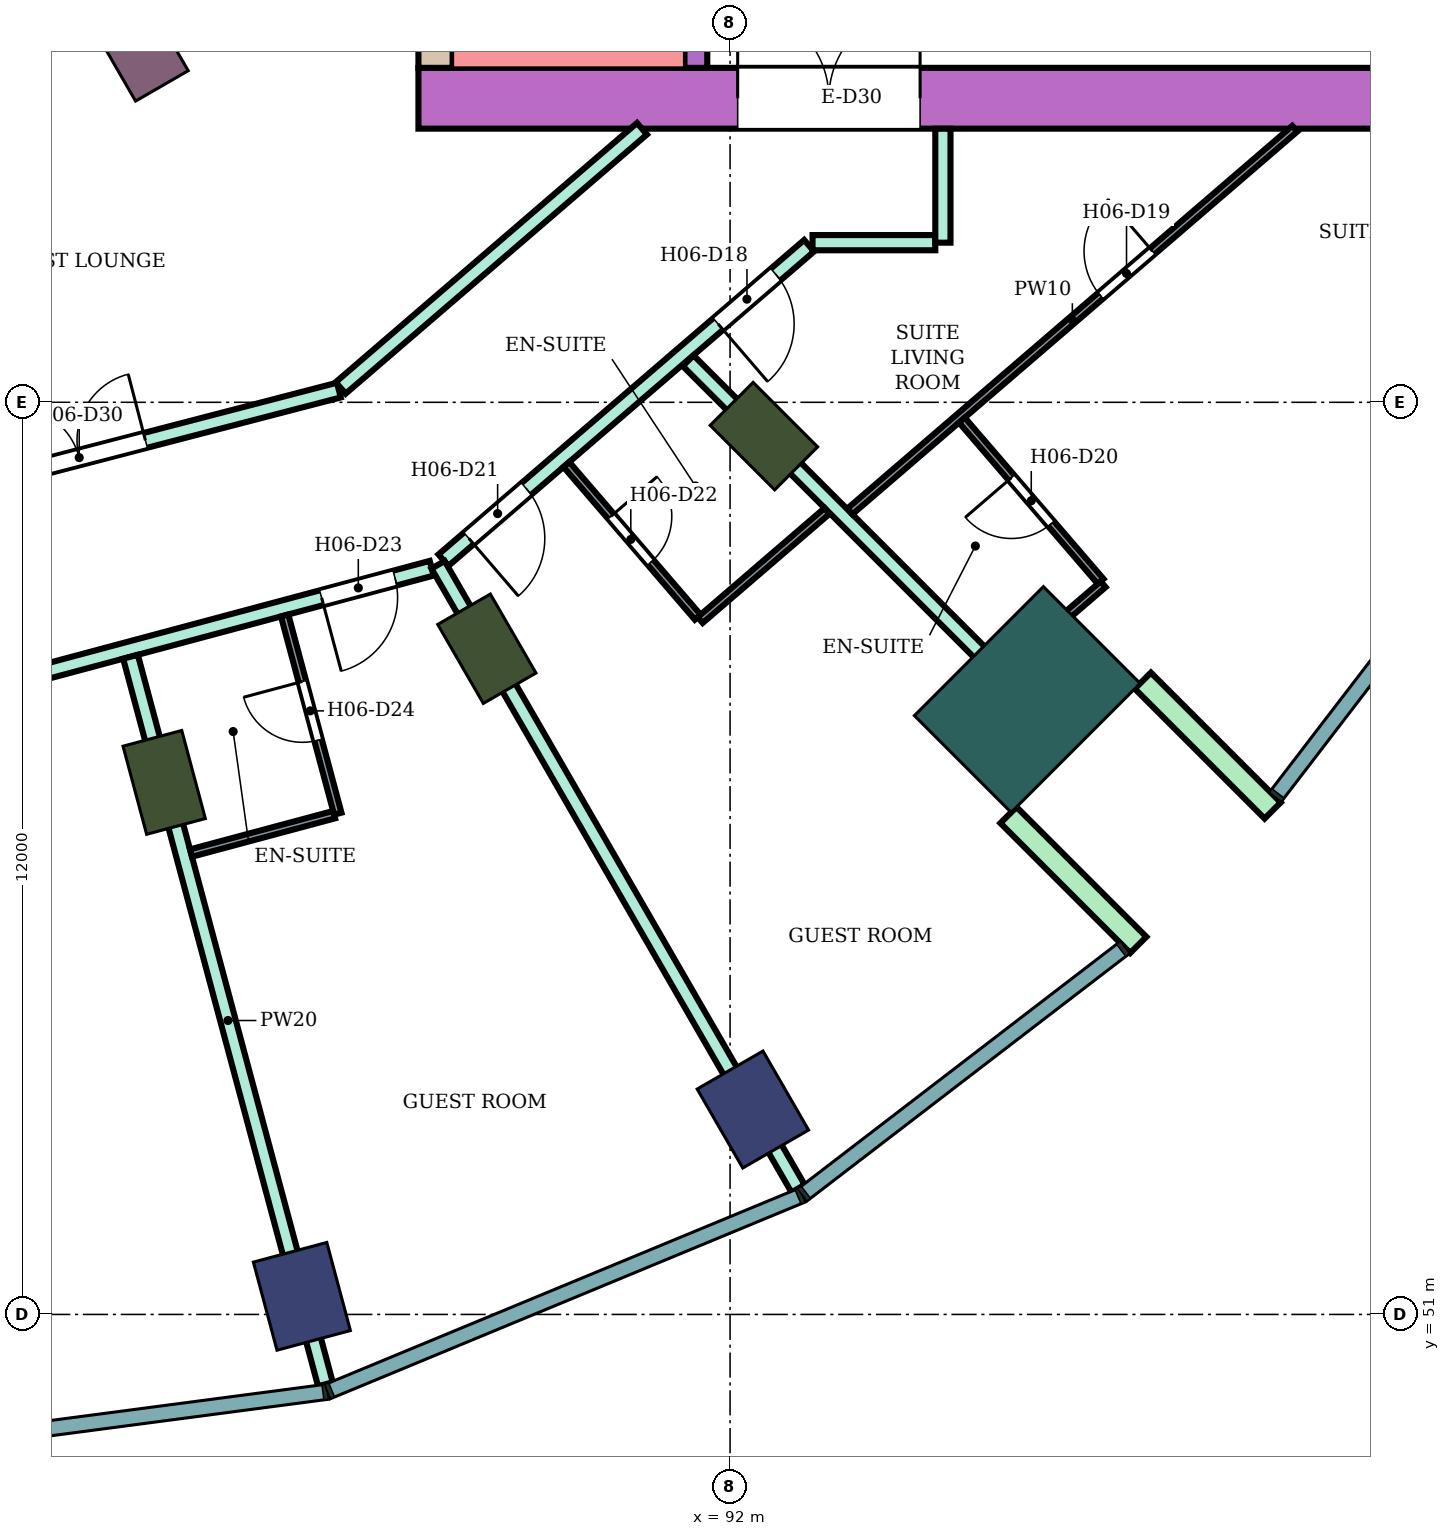
"""IFC4 building model, lengths in metres.
Left out: names, types, materials, properties, quantities, classifications, styles, units other than length and angle.
Written with IfcOpenShell. Run it as: python <this file> out.ifc"""

import sys

from ifc_helpers import new_model, si_unit, direction, frame, frame_2d, origin, origin_2d, place, context, subcontext, project, spatial, rectangle, extrude, element, fill, save


model = new_model("IFC4")
c1 = context("Model", 3, precision=1e-05, world=origin(), true_north=direction((0.0, 1.0)))
c2 = subcontext(c1, "Body", "Model", "MODEL_VIEW")
j1 = project(units=[si_unit("LENGTHUNIT", "METRE"), si_unit("PLANEANGLEUNIT", "RADIAN")], contexts=[c1])
p1 = place(None, origin())
s1 = spatial("IfcSite", under=j1, at=p1, CompositionType="ELEMENT")
p2 = place(p1, origin())
s2 = spatial("IfcBuilding", under=s1, at=p2, CompositionType="ELEMENT")
p3 = place(p2, frame((0.0, 0.0, 97.6)))
s3 = spatial("IfcBuildingStorey", under=s2, at=p3, CompositionType="ELEMENT", Elevation=97.6)
for number, where, z_axis, x_axis in (
    (1, (86.367, 51.238, 0.0), (0.0, 0.0, 1.0), (0.259, -0.966, 0.0)),
    (2, (92.3, 53.696, 0.0), (0.0, 0.0, 1.0), (0.5, -0.866, 0.0)),
):
    element("IfcColumn", number, at=place(p3, frame(where, z_axis=z_axis, x_axis=x_axis)), inside=s3, PredefinedType="COLUMN", context=c2, shape_type="SweptSolid", body=[
        extrude(rectangle(XDim=1.2, YDim=1.0, at=origin_2d()), origin(), (0.0, 0.0, 1.0), 3.8),
    ])
for number, where, z_axis, x_axis in (
    (3, (84.555, 58.0, 0.0), (0.0, 0.0, 1.0), (0.259, -0.966, 0.0)),
    (4, (88.8, 59.758, 0.0), (0.0, 0.0, 1.0), (0.5, -0.866, 0.0)),
    (5, (92.445, 62.555, 0.0), (0.0, 0.0, 1.0), (0.707, -0.707, 0.0)),
):
    element("IfcColumn", number, at=place(p3, frame(where, z_axis=z_axis, x_axis=x_axis)), inside=s3, PredefinedType="COLUMN", context=c2, shape_type="SweptSolid", body=[
        extrude(rectangle(XDim=1.2, YDim=0.8, at=origin_2d()), origin(), (0.0, 0.0, 1.0), 3.8),
    ])
p4 = place(p3, frame((84.3, 67.552, 0.0), z_axis=(0.0, 0.0, 1.0), x_axis=(0.5, -0.866025403784, 0.0)))
e6 = element("IfcColumn", 6, at=p4, inside=s3, PredefinedType="COLUMN", context=c2, shape_type="SweptSolid", body=[
    extrude(rectangle(XDim=0.9, YDim=0.8, at=origin_2d()), origin(), (0.0, 0.0, 1.0), 3.8),
])
p5 = place(p3, frame((95.91, 59.09, 0.0), z_axis=(0.0, 0.0, 1.0), x_axis=(0.707106781187, -0.707106781187, 0.0)))
e7 = element("IfcColumn", 7, at=p5, inside=s3, PredefinedType="COLUMN", context=c2, shape_type="SweptSolid", body=[
    extrude(rectangle(XDim=1.8, YDim=2.4, at=origin_2d()), origin(), (0.0, 0.0, 1.0), 3.8),
])
p6 = place(p3, frame((87.9, 67.0, 0.0), z_axis=(0.0, 0.0, 1.0), x_axis=(1.0, 0.0, 0.0)))
e8 = element("IfcWall", 8, at=p6, inside=s3, PredefinedType="SHEAR", context=c2, shape_type="SweptSolid", body=[
    extrude(rectangle(XDim=14.7, YDim=0.8, at=frame_2d((7.35, 0.0))), origin(), (0.0, 0.0, 1.0), 3.48),
])
p7 = place(p6, frame((4.2, 0.0, 0.0)))
e9 = element("IfcOpeningElement", 9, at=p7, cuts=e8, PredefinedType="OPENING", context=c2, shape_type="SweptSolid", body=[
    extrude(rectangle(XDim=2.4, YDim=2.4, at=frame_2d((1.2, 1.2))), frame((0.0, 0.41, 0.0), z_axis=(0.0, -1.0, 0.0), x_axis=(1.0, 0.0, 0.0)), (0.0, 0.0, 1.0), 0.82),
])
p8 = place(p3, frame((88.125, 67.4, 0.0), z_axis=(0.0, 0.0, 1.0), x_axis=(0.0, 1.0, 0.0)))
e10 = element("IfcWall", 10, at=p8, inside=s3, PredefinedType="SHEAR", context=c2, shape_type="SweptSolid", body=[
    extrude(rectangle(XDim=7.6, YDim=0.45, at=frame_2d((3.8, 0.0))), origin(), (0.0, 0.0, 1.0), 3.48),
])
p9 = place(p3, frame((91.55, 67.4, 0.0), z_axis=(0.0, 0.0, 1.0), x_axis=(0.0, 1.0, 0.0)))
e11 = element("IfcWall", 11, at=p9, inside=s3, PredefinedType="SHEAR", context=c2, shape_type="SweptSolid", body=[
    extrude(rectangle(XDim=7.6, YDim=0.3, at=frame_2d((3.8, 0.0))), origin(), (0.0, 0.0, 1.0), 3.48),
])
p10 = place(p9, frame((0.25, 0.0, 0.0)))
e12 = element("IfcOpeningElement", 12, at=p10, cuts=e11, PredefinedType="OPENING", context=c2, shape_type="SweptSolid", body=[
    extrude(rectangle(XDim=0.9, YDim=2.1, at=frame_2d((0.45, 1.05))), frame((0.0, 0.16, 0.0), z_axis=(0.0, -1.0, 0.0), x_axis=(1.0, 0.0, 0.0)), (0.0, 0.0, 1.0), 0.32),
])
for number, where, z_axis, x_axis in (
    (13, (95.662, 57.57, 0.0), (0.0, 0.0, 1.0), (0.707, -0.707, 0.0)),
    (14, (97.43, 59.338, 0.0), (0.0, 0.0, 1.0), (0.707, -0.707, 0.0)),
):
    element("IfcWall", number, at=place(p3, frame(where, z_axis=z_axis, x_axis=x_axis)), inside=s3, PredefinedType="NOTDEFINED", context=c2, shape_type="SweptSolid", body=[
        extrude(rectangle(XDim=2.416, YDim=0.3, at=frame_2d((1.208, 0.0))), origin(), (0.0, 0.0, 1.0), 3.8),
    ])
p11 = place(p3, frame((80.0, 67.396, 0.0), z_axis=(0.0, 0.0, 1.0), x_axis=(0.965933654434, 0.258789828301, 0.0)))
e15 = element("IfcWall", 15, at=p11, inside=s3, PredefinedType="NOTDEFINED", context=c2, shape_type="SweptSolid", body=[
    extrude(rectangle(XDim=3.936, YDim=0.2, at=frame_2d((1.968, 0.0))), origin(), (0.0, 0.0, 1.0), 3.8),
])
p12 = place(p11, frame((0.468, 0.0, 0.9)))
e16 = element("IfcOpeningElement", 16, at=p12, cuts=e15, PredefinedType="OPENING", context=c2, shape_type="SweptSolid", body=[
    extrude(rectangle(XDim=3.0, YDim=2.3, at=frame_2d((1.5, 1.15))), frame((0.0, 0.11, 0.0), z_axis=(0.0, -1.0, 0.0), x_axis=(1.0, 0.0, 0.0)), (0.0, 0.0, 1.0), 0.22),
])
p13 = place(p3, frame((80.119, 61.41, 0.0), z_axis=(0.0, 0.0, 1.0), x_axis=(0.967823361235, 0.251630565408, 0.0)))
e17 = element("IfcWall", 17, at=p13, inside=s3, PredefinedType="PARTITIONING", context=c2, shape_type="SweptSolid", body=[
    extrude(rectangle(XDim=6.958, YDim=0.2, at=frame_2d((3.479, 0.0))), origin(), (0.0, 0.0, 1.0), 3.35),
])
p14 = place(p13, frame((2.529, 0.0, 0.0)))
e18 = element("IfcOpeningElement", 18, at=p14, cuts=e17, PredefinedType="OPENING", context=c2, shape_type="SweptSolid", body=[
    extrude(rectangle(XDim=1.8, YDim=2.1, at=frame_2d((0.9, 1.05))), frame((0.0, 0.11, 0.0), z_axis=(0.0, -1.0, 0.0), x_axis=(1.0, 0.0, 0.0)), (0.0, 0.0, 1.0), 0.22),
])
p15 = place(p3, frame((80.0, 58.655, 0.0), z_axis=(0.0, 0.0, 1.0), x_axis=(0.965967338894, 0.258664068224, 0.0)))
e19 = element("IfcWall", 19, at=p15, inside=s3, PredefinedType="PARTITIONING", context=c2, shape_type="SweptSolid", body=[
    extrude(rectangle(XDim=8.36, YDim=0.2, at=frame_2d((4.18, 0.0))), origin(), (0.0, 0.0, 1.0), 3.35),
])
p16 = place(p15, frame((6.86, 0.0, 0.0)))
e20 = element("IfcOpeningElement", 20, at=p16, cuts=e19, PredefinedType="OPENING", context=c2, shape_type="SweptSolid", body=[
    extrude(rectangle(XDim=1.0, YDim=2.1, at=frame_2d((0.5, 1.05))), frame((0.0, 0.11, 0.0), z_axis=(0.0, -1.0, 0.0), x_axis=(1.0, 0.0, 0.0)), (0.0, 0.0, 1.0), 0.22),
])
p17 = place(p3, frame((84.112, 59.652, 0.0), z_axis=(0.0, 0.0, 1.0), x_axis=(0.258792739659, -0.965932874428, 0.0)))
e21 = element("IfcWall", 21, at=p17, inside=s3, PredefinedType="PARTITIONING", context=c2, shape_type="SweptSolid", body=[
    extrude(rectangle(XDim=9.908, YDim=0.2, at=frame_2d((4.954, 0.0))), origin(), (0.0, 0.0, 1.0), 3.35),
])
p18 = place(p3, frame((86.877, 63.189, 0.0), z_axis=(0.0, 0.0, 1.0), x_axis=(0.758088707506, 0.652151448325, 0.0)))
e22 = element("IfcWall", 22, at=p18, inside=s3, PredefinedType="PARTITIONING", context=c2, shape_type="SweptSolid", body=[
    extrude(rectangle(XDim=5.229, YDim=0.2, at=frame_2d((2.615, 0.0))), origin(), (0.0, 0.0, 1.0), 3.35),
])
p19 = place(p3, frame((88.229, 60.923, 0.0), z_axis=(0.0, 0.0, 1.0), x_axis=(0.758220952094, 0.651997690031, 0.0)))
e23 = element("IfcWall", 23, at=p19, inside=s3, PredefinedType="PARTITIONING", context=c2, shape_type="SweptSolid", body=[
    extrude(rectangle(XDim=6.346, YDim=0.2, at=frame_2d((3.173, 0.0))), origin(), (0.0, 0.0, 1.0), 3.35),
])
p20 = place(p19, frame((4.767, 0.0, 0.0)))
e24 = element("IfcOpeningElement", 24, at=p20, cuts=e23, PredefinedType="OPENING", context=c2, shape_type="SweptSolid", body=[
    extrude(rectangle(XDim=1.0, YDim=2.1, at=frame_2d((0.5, 1.05))), frame((0.0, 0.11, 0.0), z_axis=(0.0, -1.0, 0.0), x_axis=(1.0, 0.0, 0.0)), (0.0, 0.0, 1.0), 0.22),
])
p21 = place(p19, frame((0.44, 0.0, 0.0)))
e25 = element("IfcOpeningElement", 25, at=p21, cuts=e23, PredefinedType="OPENING", context=c2, shape_type="SweptSolid", body=[
    extrude(rectangle(XDim=1.0, YDim=2.1, at=frame_2d((0.5, 1.05))), frame((0.0, 0.11, 0.0), z_axis=(0.0, -1.0, 0.0), x_axis=(1.0, 0.0, 0.0)), (0.0, 0.0, 1.0), 0.22),
])
p22 = place(p3, frame((88.158, 60.862, 0.0), z_axis=(0.0, 0.0, 1.0), x_axis=(0.499916512745, -0.866073599808, 0.0)))
e26 = element("IfcWall", 26, at=p22, inside=s3, PredefinedType="PARTITIONING", context=c2, shape_type="SweptSolid", body=[
    extrude(rectangle(XDim=9.475, YDim=0.2, at=frame_2d((4.737, 0.0))), origin(), (0.0, 0.0, 1.0), 3.35),
])
p23 = place(p3, frame((91.448, 63.547, 0.0), z_axis=(0.0, 0.0, 1.0), x_axis=(0.706949958062, -0.707263569538, 0.0)))
e27 = element("IfcWall", 27, at=p23, inside=s3, PredefinedType="PARTITIONING", context=c2, shape_type="SweptSolid", body=[
    extrude(rectangle(XDim=7.006, YDim=0.2, at=frame_2d((3.503, 0.0))), origin(), (0.0, 0.0, 1.0), 3.35),
])
p24 = place(p3, frame((93.085, 65.1, 0.0), z_axis=(0.0, 0.0, 1.0), x_axis=(1.0, 0.0, 0.0)))
e28 = element("IfcWall", 28, at=p24, inside=s3, PredefinedType="PARTITIONING", context=c2, shape_type="SweptSolid", body=[
    extrude(rectangle(XDim=1.615, YDim=0.2, at=frame_2d((0.808, 0.0))), origin(), (0.0, 0.0, 1.0), 3.35),
])
p25 = place(p3, frame((94.8, 65.1, 0.0), z_axis=(0.0, 0.0, 1.0), x_axis=(0.0, 1.0, 0.0)))
e29 = element("IfcWall", 29, at=p25, inside=s3, PredefinedType="PARTITIONING", context=c2, shape_type="SweptSolid", body=[
    extrude(rectangle(XDim=1.499, YDim=0.2, at=frame_2d((0.75, 0.0))), origin(), (0.0, 0.0, 1.0), 3.35),
])
p26 = place(p3, frame((84.908, 57.07, 0.0), z_axis=(0.0, 0.0, 1.0), x_axis=(0.965853538138, 0.25908867761, 0.0)))
e30 = element("IfcWall", 30, at=p26, inside=s3, PredefinedType="PARTITIONING", context=c2, shape_type="SweptSolid", body=[
    extrude(rectangle(XDim=1.95, YDim=0.1, at=frame_2d((0.975, 0.0))), origin(), (0.0, 0.0, 1.0), 3.35),
])
p27 = place(p3, frame((86.14, 60.196, 0.0), z_axis=(0.0, 0.0, 1.0), x_axis=(0.258945475746, -0.965891940432, 0.0)))
e31 = element("IfcWall", 31, at=p27, inside=s3, PredefinedType="PARTITIONING", context=c2, shape_type="SweptSolid", body=[
    extrude(rectangle(XDim=2.7, YDim=0.1, at=frame_2d((1.35, 0.0))), origin(), (0.0, 0.0, 1.0), 3.35),
])
p28 = place(p27, frame((0.9, 0.0, 0.0)))
e32 = element("IfcOpeningElement", 32, at=p28, cuts=e31, PredefinedType="OPENING", context=c2, shape_type="SweptSolid", body=[
    extrude(rectangle(XDim=0.8, YDim=2.1, at=frame_2d((0.4, 1.05))), frame((0.0, 0.06, 0.0), z_axis=(0.0, -1.0, 0.0), x_axis=(1.0, 0.0, 0.0)), (0.0, 0.0, 1.0), 0.12),
])
p29 = place(p3, frame((89.846, 62.182, 0.0), z_axis=(0.0, 0.0, 1.0), x_axis=(0.652095405055, -0.758136915541, 0.0)))
e33 = element("IfcWall", 33, at=p29, inside=s3, PredefinedType="PARTITIONING", context=c2, shape_type="SweptSolid", body=[
    extrude(rectangle(XDim=2.65, YDim=0.1, at=frame_2d((1.325, 0.0))), origin(), (0.0, 0.0, 1.0), 3.35),
])
p30 = place(p29, frame((0.9, 0.0, 0.0)))
e34 = element("IfcOpeningElement", 34, at=p30, cuts=e33, PredefinedType="OPENING", context=c2, shape_type="SweptSolid", body=[
    extrude(rectangle(XDim=0.8, YDim=2.1, at=frame_2d((0.4, 1.05))), frame((0.0, 0.06, 0.0), z_axis=(0.0, -1.0, 0.0), x_axis=(1.0, 0.0, 0.0)), (0.0, 0.0, 1.0), 0.12),
])
p31 = place(p3, frame((91.607, 60.135, 0.0), z_axis=(0.0, 0.0, 1.0), x_axis=(0.758135842672, 0.652096652388, 0.0)))
e35 = element("IfcWall", 35, at=p31, inside=s3, PredefinedType="PARTITIONING", context=c2, shape_type="SweptSolid", body=[
    extrude(rectangle(XDim=2.201, YDim=0.1, at=frame_2d((1.101, 0.0))), origin(), (0.0, 0.0, 1.0), 3.35),
])
p32 = place(p3, frame((93.577, 61.565, 0.0), z_axis=(0.0, 0.0, 1.0), x_axis=(0.75812140399, 0.652113438607, 0.0)))
e36 = element("IfcWall", 36, at=p32, inside=s3, PredefinedType="PARTITIONING", context=c2, shape_type="SweptSolid", body=[
    extrude(rectangle(XDim=7.72, YDim=0.1, at=frame_2d((3.86, 0.0))), origin(), (0.0, 0.0, 1.0), 3.35),
])
p33 = place(p32, frame((4.35, 0.0, 0.0)))
e37 = element("IfcOpeningElement", 37, at=p33, cuts=e36, PredefinedType="OPENING", context=c2, shape_type="SweptSolid", body=[
    extrude(rectangle(XDim=0.9, YDim=2.1, at=frame_2d((0.45, 1.05))), frame((0.0, 0.06, 0.0), z_axis=(0.0, -1.0, 0.0), x_axis=(1.0, 0.0, 0.0)), (0.0, 0.0, 1.0), 0.12),
])
p34 = place(p3, frame((95.05, 62.766, 0.0), z_axis=(0.0, 0.0, 1.0), x_axis=(0.652190642827, -0.75805498838, 0.0)))
e38 = element("IfcWall", 38, at=p34, inside=s3, PredefinedType="PARTITIONING", context=c2, shape_type="SweptSolid", body=[
    extrude(rectangle(XDim=2.8, YDim=0.1, at=frame_2d((1.4, 0.0))), origin(), (0.0, 0.0, 1.0), 3.35),
])
p35 = place(p34, frame((1.0, 0.0, 0.0)))
e39 = element("IfcOpeningElement", 39, at=p35, cuts=e38, PredefinedType="OPENING", context=c2, shape_type="SweptSolid", body=[
    extrude(rectangle(XDim=0.8, YDim=2.1, at=frame_2d((0.4, 1.05))), frame((0.0, 0.06, 0.0), z_axis=(0.0, -1.0, 0.0), x_axis=(1.0, 0.0, 0.0)), (0.0, 0.0, 1.0), 0.12),
])
p36 = place(p3, frame((95.634, 59.509, 0.0), z_axis=(0.0, 0.0, 1.0), x_axis=(0.757922369717, 0.652344756614, 0.0)))
e40 = element("IfcWall", 40, at=p36, inside=s3, PredefinedType="PARTITIONING", context=c2, shape_type="SweptSolid", body=[
    extrude(rectangle(XDim=1.681, YDim=0.1, at=frame_2d((0.841, 0.0))), origin(), (0.0, 0.0, 1.0), 3.35),
])
p37 = place(p12, origin())
e41 = element("IfcWindow", 41, at=p37, inside=s3, PartitioningType="SINGLE_PANEL", PredefinedType="WINDOW", context=c2, shape_type="SweptSolid", body=[
    extrude(rectangle(XDim=3.0, YDim=2.3, at=frame_2d((1.5, 1.15))), frame((0.0, 0.03, 0.0), z_axis=(0.0, -1.0, 0.0), x_axis=(1.0, 0.0, 0.0)), (0.0, 0.0, 1.0), 0.06),
])
fill(e16, e41)
p38 = place(p20, frame((1.0, 0.0, 0.0), z_axis=(0.0, 0.0, 1.0), x_axis=(-1.0, 0.0, 0.0)))
e42 = element("IfcDoor", 42, at=p38, inside=s3, OperationType="SINGLE_SWING_RIGHT", PredefinedType="DOOR", context=c2, shape_type="SweptSolid", body=[
    extrude(rectangle(XDim=1.0, YDim=2.1, at=frame_2d((0.5, 1.05))), frame((0.0, 0.025, 0.0), z_axis=(0.0, -1.0, 0.0), x_axis=(1.0, 0.0, 0.0)), (0.0, 0.0, 1.0), 0.05),
])
fill(e24, e42)
p39 = place(p33, origin())
e43 = element("IfcDoor", 43, at=p39, inside=s3, OperationType="SINGLE_SWING_RIGHT", PredefinedType="DOOR", context=c2, shape_type="SweptSolid", body=[
    extrude(rectangle(XDim=0.9, YDim=2.1, at=frame_2d((0.45, 1.05))), frame((0.0, 0.025, 0.0), z_axis=(0.0, -1.0, 0.0), x_axis=(1.0, 0.0, 0.0)), (0.0, 0.0, 1.0), 0.05),
])
fill(e37, e43)
p40 = place(p35, frame((0.8, 0.0, 0.0), z_axis=(0.0, 0.0, 1.0), x_axis=(-1.0, 0.0, 0.0)))
e44 = element("IfcDoor", 44, at=p40, inside=s3, OperationType="SINGLE_SWING_RIGHT", PredefinedType="DOOR", context=c2, shape_type="SweptSolid", body=[
    extrude(rectangle(XDim=0.8, YDim=2.1, at=frame_2d((0.4, 1.05))), frame((0.0, 0.025, 0.0), z_axis=(0.0, -1.0, 0.0), x_axis=(1.0, 0.0, 0.0)), (0.0, 0.0, 1.0), 0.05),
])
fill(e39, e44)
p41 = place(p21, frame((1.0, 0.0, 0.0), z_axis=(0.0, 0.0, 1.0), x_axis=(-1.0, 0.0, 0.0)))
e45 = element("IfcDoor", 45, at=p41, inside=s3, OperationType="SINGLE_SWING_RIGHT", PredefinedType="DOOR", context=c2, shape_type="SweptSolid", body=[
    extrude(rectangle(XDim=1.0, YDim=2.1, at=frame_2d((0.5, 1.05))), frame((0.0, 0.025, 0.0), z_axis=(0.0, -1.0, 0.0), x_axis=(1.0, 0.0, 0.0)), (0.0, 0.0, 1.0), 0.05),
])
fill(e25, e45)
p42 = place(p30, origin())
e46 = element("IfcDoor", 46, at=p42, inside=s3, OperationType="SINGLE_SWING_LEFT", PredefinedType="DOOR", context=c2, shape_type="SweptSolid", body=[
    extrude(rectangle(XDim=0.8, YDim=2.1, at=frame_2d((0.4, 1.05))), frame((0.0, 0.025, 0.0), z_axis=(0.0, -1.0, 0.0), x_axis=(1.0, 0.0, 0.0)), (0.0, 0.0, 1.0), 0.05),
])
fill(e34, e46)
p43 = place(p16, frame((1.0, 0.0, 0.0), z_axis=(0.0, 0.0, 1.0), x_axis=(-1.0, 0.0, 0.0)))
e47 = element("IfcDoor", 47, at=p43, inside=s3, OperationType="SINGLE_SWING_RIGHT", PredefinedType="DOOR", context=c2, shape_type="SweptSolid", body=[
    extrude(rectangle(XDim=1.0, YDim=2.1, at=frame_2d((0.5, 1.05))), frame((0.0, 0.025, 0.0), z_axis=(0.0, -1.0, 0.0), x_axis=(1.0, 0.0, 0.0)), (0.0, 0.0, 1.0), 0.05),
])
fill(e20, e47)
p44 = place(p28, frame((0.8, 0.0, 0.0), z_axis=(0.0, 0.0, 1.0), x_axis=(-1.0, 0.0, 0.0)))
e48 = element("IfcDoor", 48, at=p44, inside=s3, OperationType="SINGLE_SWING_RIGHT", PredefinedType="DOOR", context=c2, shape_type="SweptSolid", body=[
    extrude(rectangle(XDim=0.8, YDim=2.1, at=frame_2d((0.4, 1.05))), frame((0.0, 0.025, 0.0), z_axis=(0.0, -1.0, 0.0), x_axis=(1.0, 0.0, 0.0)), (0.0, 0.0, 1.0), 0.05),
])
fill(e32, e48)
p45 = place(p14, origin())
e49 = element("IfcDoor", 49, at=p45, inside=s3, OperationType="DOUBLE_DOOR_SINGLE_SWING", PredefinedType="DOOR", context=c2, shape_type="SweptSolid", body=[
    extrude(rectangle(XDim=1.8, YDim=2.1, at=frame_2d((0.9, 1.05))), frame((0.0, 0.025, 0.0), z_axis=(0.0, -1.0, 0.0), x_axis=(1.0, 0.0, 0.0)), (0.0, 0.0, 1.0), 0.05),
])
fill(e18, e49)
p46 = place(p7, origin())
e50 = element("IfcDoor", 50, at=p46, inside=s3, OperationType="DOUBLE_DOOR_SINGLE_SWING", PredefinedType="DOOR", context=c2, shape_type="SweptSolid", body=[
    extrude(rectangle(XDim=2.4, YDim=2.4, at=frame_2d((1.2, 1.2))), frame((0.0, 0.025, 0.0), z_axis=(0.0, -1.0, 0.0), x_axis=(1.0, 0.0, 0.0)), (0.0, 0.0, 1.0), 0.05),
])
fill(e9, e50)
save(model, sys.argv[1])
